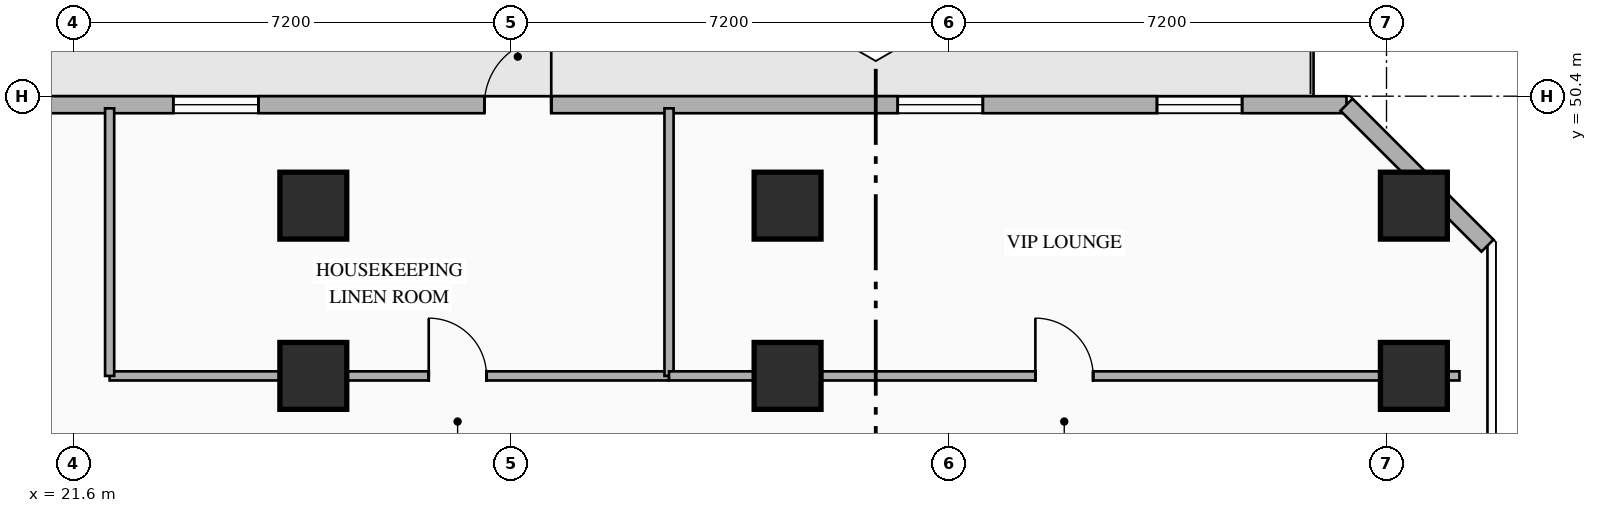
"""IFC4 building model, lengths in metres.
Left out: names, types, materials, properties, quantities, classifications, styles, units other than length and angle.
Written with IfcOpenShell. Run it as: python <this file> out.ifc"""

import sys

from ifc_helpers import new_model, si_unit, direction, frame, frame_2d, origin, origin_2d, place, context, subcontext, project, spatial, rectangle, hollow_rectangle, extrude, element, fill, save


model = new_model("IFC4")
c1 = context("Model", 3, precision=1e-05, world=origin(), true_north=direction((0.0, 1.0)))
c2 = subcontext(c1, "Body", "Model", "MODEL_VIEW")
j1 = project(units=[si_unit("LENGTHUNIT", "METRE"), si_unit("PLANEANGLEUNIT", "RADIAN")], contexts=[c1])
p1 = place(None, origin())
s1 = spatial("IfcSite", under=j1, at=p1, CompositionType="ELEMENT")
p2 = place(p1, origin())
s2 = spatial("IfcBuilding", under=s1, at=p2, CompositionType="ELEMENT")
p3 = place(p2, frame((0.0, 0.0, 63.4)))
s3 = spatial("IfcBuildingStorey", under=s2, at=p3, CompositionType="ELEMENT", Elevation=63.4)
for number, where, z_axis, x_axis in (
    (1, (25.55, 45.8, 0.0), (0.0, 0.0, 1.0), (1.0, 0.0, 0.0)),
    (2, (33.35, 45.8, 0.0), (0.0, 0.0, 1.0), (1.0, 0.0, 0.0)),
    (3, (43.65, 45.8, 0.0), (0.0, 0.0, 1.0), (1.0, 0.0, 0.0)),
    (4, (25.55, 48.6, 0.0), (0.0, 0.0, 1.0), (1.0, 0.0, 0.0)),
    (5, (33.35, 48.6, 0.0), (0.0, 0.0, 1.0), (1.0, 0.0, 0.0)),
    (6, (43.65, 48.6, 0.0), (0.0, 0.0, 1.0), (1.0, 0.0, 0.0)),
):
    element("IfcColumn", number, at=place(p3, frame(where, z_axis=z_axis, x_axis=x_axis)), inside=s3, PredefinedType="COLUMN", context=c2, shape_type="SweptSolid", body=[
        extrude(hollow_rectangle(XDim=1.1, YDim=1.1, WallThickness=0.04, at=origin_2d()), origin(), (0.0, 0.0, 1.0), 3.35),
    ])
p4 = place(p3, frame((2.458, 50.26, 0.0), z_axis=(0.0, 0.0, 1.0), x_axis=(1.0, 0.0, 0.0)))
e7 = element("IfcWall", 7, at=p4, inside=s3, PredefinedType="STANDARD", context=c2, shape_type="SweptSolid", body=[
    extrude(rectangle(XDim=40.084, YDim=0.28, at=frame_2d((20.042, 0.0))), origin(), (0.0, 0.0, 1.0), 3.13),
])
p5 = place(p4, frame((25.905, 0.0, 0.0)))
e8 = element("IfcOpeningElement", 8, at=p5, cuts=e7, PredefinedType="OPENING", context=c2, shape_type="SweptSolid", body=[
    extrude(rectangle(XDim=1.1, YDim=2.2, at=frame_2d((0.55, 1.1))), frame((0.0, 0.15, 0.0), z_axis=(0.0, -1.0, 0.0), x_axis=(1.0, 0.0, 0.0)), (0.0, 0.0, 1.0), 0.3),
])
p6 = place(p4, frame((1.717, 0.0, 0.85)))
e9 = element("IfcOpeningElement", 9, at=p6, cuts=e7, PredefinedType="OPENING", context=c2, shape_type="SweptSolid", body=[
    extrude(rectangle(XDim=1.4, YDim=1.8, at=frame_2d((0.7, 0.9))), frame((0.0, 0.15, 0.0), z_axis=(0.0, -1.0, 0.0), x_axis=(1.0, 0.0, 0.0)), (0.0, 0.0, 1.0), 0.3),
])
p7 = place(p4, frame((5.981, 0.0, 0.85)))
e10 = element("IfcOpeningElement", 10, at=p7, cuts=e7, PredefinedType="OPENING", context=c2, shape_type="SweptSolid", body=[
    extrude(rectangle(XDim=1.4, YDim=1.8, at=frame_2d((0.7, 0.9))), frame((0.0, 0.15, 0.0), z_axis=(0.0, -1.0, 0.0), x_axis=(1.0, 0.0, 0.0)), (0.0, 0.0, 1.0), 0.3),
])
p8 = place(p4, frame((11.261, 0.0, 0.85)))
e11 = element("IfcOpeningElement", 11, at=p8, cuts=e7, PredefinedType="OPENING", context=c2, shape_type="SweptSolid", body=[
    extrude(rectangle(XDim=1.4, YDim=1.8, at=frame_2d((0.7, 0.9))), frame((0.0, 0.15, 0.0), z_axis=(0.0, -1.0, 0.0), x_axis=(1.0, 0.0, 0.0)), (0.0, 0.0, 1.0), 0.3),
])
p9 = place(p4, frame((14.02, 0.0, 0.85)))
e12 = element("IfcOpeningElement", 12, at=p9, cuts=e7, PredefinedType="OPENING", context=c2, shape_type="SweptSolid", body=[
    extrude(rectangle(XDim=1.4, YDim=1.8, at=frame_2d((0.7, 0.9))), frame((0.0, 0.15, 0.0), z_axis=(0.0, -1.0, 0.0), x_axis=(1.0, 0.0, 0.0)), (0.0, 0.0, 1.0), 0.3),
])
p10 = place(p4, frame((20.789, 0.0, 0.85)))
e13 = element("IfcOpeningElement", 13, at=p10, cuts=e7, PredefinedType="OPENING", context=c2, shape_type="SweptSolid", body=[
    extrude(rectangle(XDim=1.4, YDim=1.8, at=frame_2d((0.7, 0.9))), frame((0.0, 0.15, 0.0), z_axis=(0.0, -1.0, 0.0), x_axis=(1.0, 0.0, 0.0)), (0.0, 0.0, 1.0), 0.3),
])
p11 = place(p4, frame((32.703, 0.0, 0.85)))
e14 = element("IfcOpeningElement", 14, at=p11, cuts=e7, PredefinedType="OPENING", context=c2, shape_type="SweptSolid", body=[
    extrude(rectangle(XDim=1.4, YDim=1.8, at=frame_2d((0.7, 0.9))), frame((0.0, 0.15, 0.0), z_axis=(0.0, -1.0, 0.0), x_axis=(1.0, 0.0, 0.0)), (0.0, 0.0, 1.0), 0.3),
])
p12 = place(p4, frame((36.967, 0.0, 0.85)))
e15 = element("IfcOpeningElement", 15, at=p12, cuts=e7, PredefinedType="OPENING", context=c2, shape_type="SweptSolid", body=[
    extrude(rectangle(XDim=1.4, YDim=1.8, at=frame_2d((0.7, 0.9))), frame((0.0, 0.15, 0.0), z_axis=(0.0, -1.0, 0.0), x_axis=(1.0, 0.0, 0.0)), (0.0, 0.0, 1.0), 0.3),
])
p13 = place(p3, frame((42.542, 50.26, 0.0), z_axis=(0.0, 0.0, 1.0), x_axis=(0.707106781187, -0.707106781187, 0.0)))
e16 = element("IfcWall", 16, at=p13, inside=s3, PredefinedType="STANDARD", context=c2, shape_type="SweptSolid", body=[
    extrude(rectangle(XDim=3.278, YDim=0.28, at=frame_2d((1.639, 0.0))), origin(), (0.0, 0.0, 1.0), 3.13),
])
p14 = place(p3, frame((22.2, 45.8, 0.0), z_axis=(0.0, 0.0, 1.0), x_axis=(1.0, 0.0, 0.0)))
e17 = element("IfcWall", 17, at=p14, inside=s3, PredefinedType="PARTITIONING", context=c2, shape_type="SweptSolid", body=[
    extrude(rectangle(XDim=9.2, YDim=0.15, at=frame_2d((4.6, 0.0))), origin(), (0.0, 0.0, 1.0), 2.425),
])
p15 = place(p14, frame((5.248, 0.0, 0.0)))
e18 = element("IfcOpeningElement", 18, at=p15, cuts=e17, PredefinedType="OPENING", context=c2, shape_type="SweptSolid", body=[
    extrude(rectangle(XDim=0.95, YDim=2.15, at=frame_2d((0.475, 1.075))), frame((0.0, 0.085, 0.0), z_axis=(0.0, -1.0, 0.0), x_axis=(1.0, 0.0, 0.0)), (0.0, 0.0, 1.0), 0.17),
])
for number, where, z_axis, x_axis in (
    (19, (22.2, 45.8, 0.0), (0.0, 0.0, 1.0), (0.0, 1.0, 0.0)),
    (20, (31.4, 45.8, 0.0), (0.0, 0.0, 1.0), (0.0, 1.0, 0.0)),
):
    element("IfcWall", number, at=place(p3, frame(where, z_axis=z_axis, x_axis=x_axis)), inside=s3, PredefinedType="PARTITIONING", context=c2, shape_type="SweptSolid", body=[
        extrude(rectangle(XDim=4.4, YDim=0.15, at=frame_2d((2.2, 0.0))), origin(), (0.0, 0.0, 1.0), 3.13),
    ])
p16 = place(p3, frame((31.4, 45.8, 0.0), z_axis=(0.0, 0.0, 1.0), x_axis=(1.0, 0.0, 0.0)))
e21 = element("IfcWall", 21, at=p16, inside=s3, PredefinedType="PARTITIONING", context=c2, shape_type="SweptSolid", body=[
    extrude(rectangle(XDim=13.0, YDim=0.15, at=frame_2d((6.5, 0.0))), origin(), (0.0, 0.0, 1.0), 2.425),
])
p17 = place(p16, frame((6.025, 0.0, 0.0)))
e22 = element("IfcOpeningElement", 22, at=p17, cuts=e21, PredefinedType="OPENING", context=c2, shape_type="SweptSolid", body=[
    extrude(rectangle(XDim=0.95, YDim=2.15, at=frame_2d((0.475, 1.075))), frame((0.0, 0.085, 0.0), z_axis=(0.0, -1.0, 0.0), x_axis=(1.0, 0.0, 0.0)), (0.0, 0.0, 1.0), 0.17),
])
p18 = place(p5, origin())
e23 = element("IfcDoor", 23, at=p18, inside=s3, OperationType="SINGLE_SWING_RIGHT", PredefinedType="DOOR", context=c2, shape_type="SweptSolid", body=[
    extrude(rectangle(XDim=1.1, YDim=2.2, at=frame_2d((0.55, 1.1))), frame((0.0, 0.025, 0.0), z_axis=(0.0, -1.0, 0.0), x_axis=(1.0, 0.0, 0.0)), (0.0, 0.0, 1.0), 0.05),
])
fill(e8, e23)
p19 = place(p10, origin())
e24 = element("IfcWindow", 24, at=p19, inside=s3, PartitioningType="SINGLE_PANEL", PredefinedType="WINDOW", context=c2, shape_type="SweptSolid", body=[
    extrude(rectangle(XDim=1.4, YDim=1.8, at=frame_2d((0.7, 0.9))), frame((0.0, 0.03, 0.0), z_axis=(0.0, -1.0, 0.0), x_axis=(1.0, 0.0, 0.0)), (0.0, 0.0, 1.0), 0.06),
])
fill(e13, e24)
p20 = place(p11, origin())
e25 = element("IfcWindow", 25, at=p20, inside=s3, PartitioningType="SINGLE_PANEL", PredefinedType="WINDOW", context=c2, shape_type="SweptSolid", body=[
    extrude(rectangle(XDim=1.4, YDim=1.8, at=frame_2d((0.7, 0.9))), frame((0.0, 0.03, 0.0), z_axis=(0.0, -1.0, 0.0), x_axis=(1.0, 0.0, 0.0)), (0.0, 0.0, 1.0), 0.06),
])
fill(e14, e25)
p21 = place(p12, origin())
e26 = element("IfcWindow", 26, at=p21, inside=s3, PartitioningType="SINGLE_PANEL", PredefinedType="WINDOW", context=c2, shape_type="SweptSolid", body=[
    extrude(rectangle(XDim=1.4, YDim=1.8, at=frame_2d((0.7, 0.9))), frame((0.0, 0.03, 0.0), z_axis=(0.0, -1.0, 0.0), x_axis=(1.0, 0.0, 0.0)), (0.0, 0.0, 1.0), 0.06),
])
fill(e15, e26)
p22 = place(p15, origin())
e27 = element("IfcDoor", 27, at=p22, inside=s3, OperationType="SINGLE_SWING_LEFT", PredefinedType="DOOR", context=c2, shape_type="SweptSolid", body=[
    extrude(rectangle(XDim=0.95, YDim=2.15, at=frame_2d((0.475, 1.075))), frame((0.0, 0.025, 0.0), z_axis=(0.0, -1.0, 0.0), x_axis=(1.0, 0.0, 0.0)), (0.0, 0.0, 1.0), 0.05),
])
fill(e18, e27)
p23 = place(p17, origin())
e28 = element("IfcDoor", 28, at=p23, inside=s3, OperationType="SINGLE_SWING_LEFT", PredefinedType="DOOR", context=c2, shape_type="SweptSolid", body=[
    extrude(rectangle(XDim=0.95, YDim=2.15, at=frame_2d((0.475, 1.075))), frame((0.0, 0.025, 0.0), z_axis=(0.0, -1.0, 0.0), x_axis=(1.0, 0.0, 0.0)), (0.0, 0.0, 1.0), 0.05),
])
fill(e22, e28)
save(model, sys.argv[1])
